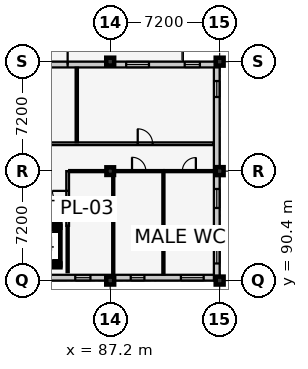
"""IFC4 building model, lengths in metres.
Left out: names, types, materials, properties, quantities, classifications, styles, units other than length and angle.
Written with IfcOpenShell. Run it as: python <this file> out.ifc"""

import sys

from ifc_helpers import new_model, si_unit, direction, frame, frame_2d, origin, origin_2d, place, context, subcontext, project, spatial, rectangle, extrude, element, fill, save


model = new_model("IFC4")
c1 = context("Model", 3, precision=1e-05, world=origin(), true_north=direction((0.0, 1.0)))
c2 = subcontext(c1, "Body", "Model", "MODEL_VIEW")
j1 = project(units=[si_unit("LENGTHUNIT", "METRE"), si_unit("PLANEANGLEUNIT", "RADIAN")], contexts=[c1])
p1 = place(None, origin())
s1 = spatial("IfcSite", under=j1, at=p1, CompositionType="ELEMENT")
p2 = place(p1, origin())
s2 = spatial("IfcBuilding", under=s1, at=p2, CompositionType="ELEMENT")
p3 = place(p2, frame((0.0, 0.0, 21.9)))
s3 = spatial("IfcBuildingStorey", under=s2, at=p3, CompositionType="ELEMENT", Elevation=21.9)
p4 = place(p3, frame((87.2, 90.4, 0.0), z_axis=(0.0, 0.0, 1.0), x_axis=(1.0, 0.0, 0.0)))
e1 = element("IfcColumn", 1, at=p4, inside=s3, PredefinedType="COLUMN", context=c2, shape_type="SweptSolid", body=[
    extrude(rectangle(XDim=0.52, YDim=0.52, at=origin_2d()), origin(), (0.0, 0.0, 1.0), 3.9),
])
p5 = place(p3, frame((87.2, 97.6, 0.0), z_axis=(0.0, 0.0, 1.0), x_axis=(1.0, 0.0, 0.0)))
e2 = element("IfcColumn", 2, at=p5, inside=s3, PredefinedType="COLUMN", context=c2, shape_type="SweptSolid", body=[
    extrude(rectangle(XDim=0.5, YDim=0.5, at=origin_2d()), origin(), (0.0, 0.0, 1.0), 3.9),
])
for number, where, z_axis, x_axis in (
    (3, (87.2, 104.8, 0.0), (0.0, 0.0, 1.0), (1.0, 0.0, 0.0)),
    (4, (94.4, 90.4, 0.0), (0.0, 0.0, 1.0), (1.0, 0.0, 0.0)),
    (5, (94.4, 97.6, 0.0), (0.0, 0.0, 1.0), (1.0, 0.0, 0.0)),
    (6, (94.4, 104.8, 0.0), (0.0, 0.0, 1.0), (1.0, 0.0, 0.0)),
):
    element("IfcColumn", number, at=place(p3, frame(where, z_axis=z_axis, x_axis=x_axis)), inside=s3, PredefinedType="COLUMN", context=c2, shape_type="SweptSolid", body=[
        extrude(rectangle(XDim=0.52, YDim=0.52, at=origin_2d()), origin(), (0.0, 0.0, 1.0), 3.9),
    ])
p6 = place(p3, frame((94.4, 90.59, 0.0), z_axis=(0.0, 0.0, 1.0), x_axis=(-1.0, 0.0, 0.0)))
e7 = element("IfcWall", 7, at=p6, inside=s3, PredefinedType="SOLIDWALL", context=c2, shape_type="SweptSolid", body=[
    extrude(rectangle(XDim=28.8, YDim=0.38, at=frame_2d((14.4, 0.0))), origin(), (0.0, 0.0, 1.0), 2.955),
])
p7 = place(p6, frame((1.05, 0.0, 0.9)))
e8 = element("IfcOpeningElement", 8, at=p7, cuts=e7, PredefinedType="OPENING", context=c2, shape_type="SweptSolid", body=[
    extrude(rectangle(XDim=1.5, YDim=1.75, at=frame_2d((0.75, 0.875))), frame((0.0, 0.202, 0.0), z_axis=(0.0, -1.0, 0.0), x_axis=(1.0, 0.0, 0.0)), (0.0, 0.0, 1.0), 0.404),
])
p8 = place(p6, frame((4.95, 0.0, 0.9)))
e9 = element("IfcOpeningElement", 9, at=p8, cuts=e7, PredefinedType="OPENING", context=c2, shape_type="SweptSolid", body=[
    extrude(rectangle(XDim=0.9, YDim=1.35, at=frame_2d((0.45, 0.675))), frame((0.0, 0.202, 0.0), z_axis=(0.0, -1.0, 0.0), x_axis=(1.0, 0.0, 0.0)), (0.0, 0.0, 1.0), 0.404),
])
p9 = place(p6, frame((8.5, 0.0, 0.9)))
e10 = element("IfcOpeningElement", 10, at=p9, cuts=e7, PredefinedType="OPENING", context=c2, shape_type="SweptSolid", body=[
    extrude(rectangle(XDim=1.0, YDim=1.35, at=frame_2d((0.5, 0.675))), frame((0.0, 0.202, 0.0), z_axis=(0.0, -1.0, 0.0), x_axis=(1.0, 0.0, 0.0)), (0.0, 0.0, 1.0), 0.404),
])
p10 = place(p6, frame((12.05, 0.0, 0.9)))
e11 = element("IfcOpeningElement", 11, at=p10, cuts=e7, PredefinedType="OPENING", context=c2, shape_type="SweptSolid", body=[
    extrude(rectangle(XDim=1.1, YDim=1.35, at=frame_2d((0.55, 0.675))), frame((0.0, 0.202, 0.0), z_axis=(0.0, -1.0, 0.0), x_axis=(1.0, 0.0, 0.0)), (0.0, 0.0, 1.0), 0.404),
])
p11 = place(p6, frame((15.6, 0.0, 0.9)))
e12 = element("IfcOpeningElement", 12, at=p11, cuts=e7, PredefinedType="OPENING", context=c2, shape_type="SweptSolid", body=[
    extrude(rectangle(XDim=1.2, YDim=1.35, at=frame_2d((0.6, 0.675))), frame((0.0, 0.202, 0.0), z_axis=(0.0, -1.0, 0.0), x_axis=(1.0, 0.0, 0.0)), (0.0, 0.0, 1.0), 0.404),
])
p12 = place(p6, frame((19.15, 0.0, 0.9)))
e13 = element("IfcOpeningElement", 13, at=p12, cuts=e7, PredefinedType="OPENING", context=c2, shape_type="SweptSolid", body=[
    extrude(rectangle(XDim=1.3, YDim=1.35, at=frame_2d((0.65, 0.675))), frame((0.0, 0.202, 0.0), z_axis=(0.0, -1.0, 0.0), x_axis=(1.0, 0.0, 0.0)), (0.0, 0.0, 1.0), 0.404),
])
p13 = place(p6, frame((26.525, 0.0, 0.9)))
e14 = element("IfcOpeningElement", 14, at=p13, cuts=e7, PredefinedType="OPENING", context=c2, shape_type="SweptSolid", body=[
    extrude(rectangle(XDim=0.95, YDim=1.45, at=frame_2d((0.475, 0.725))), frame((0.0, 0.202, 0.0), z_axis=(0.0, -1.0, 0.0), x_axis=(1.0, 0.0, 0.0)), (0.0, 0.0, 1.0), 0.404),
])
p14 = place(p3, frame((94.21, 104.8, 0.0), z_axis=(0.0, 0.0, 1.0), x_axis=(0.0, -1.0, 0.0)))
e15 = element("IfcWall", 15, at=p14, inside=s3, PredefinedType="SOLIDWALL", context=c2, shape_type="SweptSolid", body=[
    extrude(rectangle(XDim=14.4, YDim=0.38, at=frame_2d((7.2, 0.0))), origin(), (0.0, 0.0, 1.0), 2.915),
])
p15 = place(p14, frame((1.275, 0.0, 0.9)))
e16 = element("IfcOpeningElement", 16, at=p15, cuts=e15, PredefinedType="OPENING", context=c2, shape_type="SweptSolid", body=[
    extrude(rectangle(XDim=1.05, YDim=1.45, at=frame_2d((0.525, 0.725))), frame((0.0, 0.202, 0.0), z_axis=(0.0, -1.0, 0.0), x_axis=(1.0, 0.0, 0.0)), (0.0, 0.0, 1.0), 0.404),
])
p16 = place(p14, frame((8.375, 0.0, 0.9)))
e17 = element("IfcOpeningElement", 17, at=p16, cuts=e15, PredefinedType="OPENING", context=c2, shape_type="SweptSolid", body=[
    extrude(rectangle(XDim=1.25, YDim=1.45, at=frame_2d((0.625, 0.725))), frame((0.0, 0.202, 0.0), z_axis=(0.0, -1.0, 0.0), x_axis=(1.0, 0.0, 0.0)), (0.0, 0.0, 1.0), 0.404),
])
p17 = place(p14, frame((11.925, 0.0, 0.9)))
e18 = element("IfcOpeningElement", 18, at=p17, cuts=e15, PredefinedType="OPENING", context=c2, shape_type="SweptSolid", body=[
    extrude(rectangle(XDim=1.35, YDim=1.45, at=frame_2d((0.675, 0.725))), frame((0.0, 0.202, 0.0), z_axis=(0.0, -1.0, 0.0), x_axis=(1.0, 0.0, 0.0)), (0.0, 0.0, 1.0), 0.404),
])
p18 = place(p3, frame((65.6, 104.61, 0.0), z_axis=(0.0, 0.0, 1.0), x_axis=(1.0, 0.0, 0.0)))
e19 = element("IfcWall", 19, at=p18, inside=s3, PredefinedType="SOLIDWALL", context=c2, shape_type="SweptSolid", body=[
    extrude(rectangle(XDim=28.8, YDim=0.38, at=frame_2d((14.4, 0.0))), origin(), (0.0, 0.0, 1.0), 2.955),
])
p19 = place(p18, frame((17.2, 0.0, 0.0)))
e20 = element("IfcOpeningElement", 20, at=p19, cuts=e19, PredefinedType="OPENING", context=c2, shape_type="SweptSolid", body=[
    extrude(rectangle(XDim=1.6, YDim=2.2, at=frame_2d((0.8, 1.1))), frame((0.0, 0.202, 0.0), z_axis=(0.0, -1.0, 0.0), x_axis=(1.0, 0.0, 0.0)), (0.0, 0.0, 1.0), 0.404),
])
p20 = place(p18, frame((1.075, 0.0, 0.9)))
e21 = element("IfcOpeningElement", 21, at=p20, cuts=e19, PredefinedType="OPENING", context=c2, shape_type="SweptSolid", body=[
    extrude(rectangle(XDim=1.45, YDim=1.45, at=frame_2d((0.725, 0.725))), frame((0.0, 0.202, 0.0), z_axis=(0.0, -1.0, 0.0), x_axis=(1.0, 0.0, 0.0)), (0.0, 0.0, 1.0), 0.404),
])
p21 = place(p18, frame((4.95, 0.0, 0.9)))
e22 = element("IfcOpeningElement", 22, at=p21, cuts=e19, PredefinedType="OPENING", context=c2, shape_type="SweptSolid", body=[
    extrude(rectangle(XDim=0.9, YDim=1.6, at=frame_2d((0.45, 0.8))), frame((0.0, 0.202, 0.0), z_axis=(0.0, -1.0, 0.0), x_axis=(1.0, 0.0, 0.0)), (0.0, 0.0, 1.0), 0.404),
])
p22 = place(p18, frame((8.475, 0.0, 0.9)))
e23 = element("IfcOpeningElement", 23, at=p22, cuts=e19, PredefinedType="OPENING", context=c2, shape_type="SweptSolid", body=[
    extrude(rectangle(XDim=1.05, YDim=1.6, at=frame_2d((0.525, 0.8))), frame((0.0, 0.202, 0.0), z_axis=(0.0, -1.0, 0.0), x_axis=(1.0, 0.0, 0.0)), (0.0, 0.0, 1.0), 0.404),
])
p23 = place(p18, frame((12.025, 0.0, 0.9)))
e24 = element("IfcOpeningElement", 24, at=p23, cuts=e19, PredefinedType="OPENING", context=c2, shape_type="SweptSolid", body=[
    extrude(rectangle(XDim=1.15, YDim=1.6, at=frame_2d((0.575, 0.8))), frame((0.0, 0.202, 0.0), z_axis=(0.0, -1.0, 0.0), x_axis=(1.0, 0.0, 0.0)), (0.0, 0.0, 1.0), 0.404),
])
p24 = place(p18, frame((22.65, 0.0, 0.9)))
e25 = element("IfcOpeningElement", 25, at=p24, cuts=e19, PredefinedType="OPENING", context=c2, shape_type="SweptSolid", body=[
    extrude(rectangle(XDim=1.5, YDim=1.6, at=frame_2d((0.75, 0.8))), frame((0.0, 0.202, 0.0), z_axis=(0.0, -1.0, 0.0), x_axis=(1.0, 0.0, 0.0)), (0.0, 0.0, 1.0), 0.404),
])
p25 = place(p18, frame((26.5, 0.0, 0.9)))
e26 = element("IfcOpeningElement", 26, at=p25, cuts=e19, PredefinedType="OPENING", context=c2, shape_type="SweptSolid", body=[
    extrude(rectangle(XDim=1.0, YDim=1.75, at=frame_2d((0.5, 0.875))), frame((0.0, 0.202, 0.0), z_axis=(0.0, -1.0, 0.0), x_axis=(1.0, 0.0, 0.0)), (0.0, 0.0, 1.0), 0.404),
])
p26 = place(p3, frame((81.675, 91.4, 0.0), z_axis=(0.0, 0.0, 1.0), x_axis=(1.0, 0.0, 0.0)))
e27 = element("IfcWall", 27, at=p26, inside=s3, PredefinedType="SHEAR", context=c2, shape_type="SweptSolid", body=[
    extrude(rectangle(XDim=2.25, YDim=0.25, at=frame_2d((1.125, 0.0))), origin(), (0.0, 0.0, 1.0), 3.66),
])
p27 = place(p3, frame((83.925, 94.0, 0.0), z_axis=(0.0, 0.0, 1.0), x_axis=(-1.0, 0.0, 0.0)))
e28 = element("IfcWall", 28, at=p27, inside=s3, PredefinedType="SHEAR", context=c2, shape_type="SweptSolid", body=[
    extrude(rectangle(XDim=2.25, YDim=0.25, at=frame_2d((1.125, 0.0))), origin(), (0.0, 0.0, 1.0), 3.66),
])
p28 = place(p27, frame((0.625, 0.0, 0.0)))
e29 = element("IfcOpeningElement", 29, at=p28, cuts=e28, PredefinedType="OPENING", context=c2, shape_type="SweptSolid", body=[
    extrude(rectangle(XDim=1.0, YDim=2.15, at=frame_2d((0.5, 1.075))), frame((0.0, 0.137, 0.0), z_axis=(0.0, -1.0, 0.0), x_axis=(1.0, 0.0, 0.0)), (0.0, 0.0, 1.0), 0.274),
])
p29 = place(p3, frame((83.8, 91.4, 0.0), z_axis=(0.0, 0.0, 1.0), x_axis=(0.0, 1.0, 0.0)))
e30 = element("IfcWall", 30, at=p29, inside=s3, PredefinedType="SHEAR", context=c2, shape_type="SweptSolid", body=[
    extrude(rectangle(XDim=2.6, YDim=0.25, at=frame_2d((1.3, 0.0))), origin(), (0.0, 0.0, 1.0), 3.66),
])
p30 = place(p3, frame((66.0, 99.4, 0.0), z_axis=(0.0, 0.0, 1.0), x_axis=(1.0, 0.0, 0.0)))
e31 = element("IfcWall", 31, at=p30, inside=s3, PredefinedType="PARTITIONING", context=c2, shape_type="SweptSolid", body=[
    extrude(rectangle(XDim=28.0, YDim=0.18, at=frame_2d((14.0, 0.0))), origin(), (0.0, 0.0, 1.0), 3.66),
])
p31 = place(p30, frame((4.98, 0.0, 0.0)))
e32 = element("IfcOpeningElement", 32, at=p31, cuts=e31, PredefinedType="OPENING", context=c2, shape_type="SweptSolid", body=[
    extrude(rectangle(XDim=1.04, YDim=2.15, at=frame_2d((0.52, 1.075))), frame((0.0, 0.102, 0.0), z_axis=(0.0, -1.0, 0.0), x_axis=(1.0, 0.0, 0.0)), (0.0, 0.0, 1.0), 0.204),
])
p32 = place(p30, frame((14.49, 0.0, 0.0)))
e33 = element("IfcOpeningElement", 33, at=p32, cuts=e31, PredefinedType="OPENING", context=c2, shape_type="SweptSolid", body=[
    extrude(rectangle(XDim=1.02, YDim=2.12, at=frame_2d((0.51, 1.06))), frame((0.0, 0.102, 0.0), z_axis=(0.0, -1.0, 0.0), x_axis=(1.0, 0.0, 0.0)), (0.0, 0.0, 1.0), 0.204),
])
p33 = place(p30, frame((23.01, 0.0, 0.0)))
e34 = element("IfcOpeningElement", 34, at=p33, cuts=e31, PredefinedType="OPENING", context=c2, shape_type="SweptSolid", body=[
    extrude(rectangle(XDim=0.98, YDim=2.12, at=frame_2d((0.49, 1.06))), frame((0.0, 0.102, 0.0), z_axis=(0.0, -1.0, 0.0), x_axis=(1.0, 0.0, 0.0)), (0.0, 0.0, 1.0), 0.204),
])
p34 = place(p3, frame((84.4, 94.0, 0.0), z_axis=(0.0, 0.0, 1.0), x_axis=(0.0, 1.0, 0.0)))
e35 = element("IfcWall", 35, at=p34, inside=s3, PredefinedType="PARTITIONING", context=c2, shape_type="SweptSolid", body=[
    extrude(rectangle(XDim=3.6, YDim=0.18, at=frame_2d((1.8, 0.0))), origin(), (0.0, 0.0, 1.0), 3.66),
])
p35 = place(p34, frame((1.3, 0.0, 0.0)))
e36 = element("IfcOpeningElement", 36, at=p35, cuts=e35, PredefinedType="OPENING", context=c2, shape_type="SweptSolid", body=[
    extrude(rectangle(XDim=1.0, YDim=2.1, at=frame_2d((0.5, 1.05))), frame((0.0, 0.102, 0.0), z_axis=(0.0, -1.0, 0.0), x_axis=(1.0, 0.0, 0.0)), (0.0, 0.0, 1.0), 0.204),
])
p36 = place(p3, frame((84.5, 97.6, 0.0), z_axis=(0.0, 0.0, 1.0), x_axis=(1.0, 0.0, 0.0)))
e37 = element("IfcWall", 37, at=p36, inside=s3, PredefinedType="PARTITIONING", context=c2, shape_type="SweptSolid", body=[
    extrude(rectangle(XDim=2.9, YDim=0.14, at=frame_2d((1.45, 0.0))), origin(), (0.0, 0.0, 1.0), 2.985),
])
p37 = place(p3, frame((87.4, 90.8, 0.0), z_axis=(0.0, 0.0, 1.0), x_axis=(0.0, 1.0, 0.0)))
e38 = element("IfcWall", 38, at=p37, inside=s3, PredefinedType="PARTITIONING", context=c2, shape_type="SweptSolid", body=[
    extrude(rectangle(XDim=6.72, YDim=0.14, at=frame_2d((3.36, 0.0))), origin(), (0.0, 0.0, 1.0), 3.035),
])
p38 = place(p3, frame((87.48, 97.6, 0.0), z_axis=(0.0, 0.0, 1.0), x_axis=(1.0, 0.0, 0.0)))
e39 = element("IfcWall", 39, at=p38, inside=s3, PredefinedType="PARTITIONING", context=c2, shape_type="SweptSolid", body=[
    extrude(rectangle(XDim=3.22, YDim=0.14, at=frame_2d((1.61, 0.0))), origin(), (0.0, 0.0, 1.0), 2.935),
])
p39 = place(p38, frame((1.155, 0.0, 0.0)))
e40 = element("IfcOpeningElement", 40, at=p39, cuts=e39, PredefinedType="OPENING", context=c2, shape_type="SweptSolid", body=[
    extrude(rectangle(XDim=0.91, YDim=2.06, at=frame_2d((0.455, 1.03))), frame((0.0, 0.082, 0.0), z_axis=(0.0, -1.0, 0.0), x_axis=(1.0, 0.0, 0.0)), (0.0, 0.0, 1.0), 0.164),
])
p40 = place(p3, frame((90.7, 90.8, 0.0), z_axis=(0.0, 0.0, 1.0), x_axis=(0.0, 1.0, 0.0)))
e41 = element("IfcWall", 41, at=p40, inside=s3, PredefinedType="PARTITIONING", context=c2, shape_type="SweptSolid", body=[
    extrude(rectangle(XDim=6.72, YDim=0.14, at=frame_2d((3.36, 0.0))), origin(), (0.0, 0.0, 1.0), 3.405),
])
p41 = place(p3, frame((90.78, 97.6, 0.0), z_axis=(0.0, 0.0, 1.0), x_axis=(1.0, 0.0, 0.0)))
e42 = element("IfcWall", 42, at=p41, inside=s3, PredefinedType="PARTITIONING", context=c2, shape_type="SweptSolid", body=[
    extrude(rectangle(XDim=3.22, YDim=0.14, at=frame_2d((1.61, 0.0))), origin(), (0.0, 0.0, 1.0), 2.935),
])
p42 = place(p41, frame((1.165, 0.0, 0.0)))
e43 = element("IfcOpeningElement", 43, at=p42, cuts=e42, PredefinedType="OPENING", context=c2, shape_type="SweptSolid", body=[
    extrude(rectangle(XDim=0.89, YDim=2.05, at=frame_2d((0.445, 1.025))), frame((0.0, 0.082, 0.0), z_axis=(0.0, -1.0, 0.0), x_axis=(1.0, 0.0, 0.0)), (0.0, 0.0, 1.0), 0.164),
])
p43 = place(p3, frame((85.0, 99.5, 0.0), z_axis=(0.0, 0.0, 1.0), x_axis=(0.0, 1.0, 0.0)))
e44 = element("IfcWall", 44, at=p43, inside=s3, PredefinedType="PARTITIONING", context=c2, shape_type="SweptSolid", body=[
    extrude(rectangle(XDim=4.9, YDim=0.15, at=frame_2d((2.45, 0.0))), origin(), (0.0, 0.0, 1.0), 3.66),
])
p44 = place(p3, frame((84.4, 90.95, 0.0), z_axis=(0.0, 0.0, 1.0), x_axis=(0.0, 1.0, 0.0)))
e45 = element("IfcWall", 45, at=p44, inside=s3, PredefinedType="PARTITIONING", context=c2, shape_type="SweptSolid", body=[
    extrude(rectangle(XDim=3.0, YDim=0.14, at=frame_2d((1.5, 0.0))), origin(), (0.0, 0.0, 1.0), 3.66),
])
p45 = place(p7, origin())
e46 = element("IfcWindow", 46, at=p45, inside=s3, PartitioningType="SINGLE_PANEL", PredefinedType="WINDOW", context=c2, shape_type="SweptSolid", body=[
    extrude(rectangle(XDim=1.5, YDim=1.75, at=frame_2d((0.75, 0.875))), frame((0.0, 0.03, 0.0), z_axis=(0.0, -1.0, 0.0), x_axis=(1.0, 0.0, 0.0)), (0.0, 0.0, 1.0), 0.06),
])
fill(e8, e46)
p46 = place(p8, origin())
e47 = element("IfcWindow", 47, at=p46, inside=s3, PartitioningType="SINGLE_PANEL", PredefinedType="WINDOW", context=c2, shape_type="SweptSolid", body=[
    extrude(rectangle(XDim=0.9, YDim=1.35, at=frame_2d((0.45, 0.675))), frame((0.0, 0.03, 0.0), z_axis=(0.0, -1.0, 0.0), x_axis=(1.0, 0.0, 0.0)), (0.0, 0.0, 1.0), 0.06),
])
fill(e9, e47)
p47 = place(p9, origin())
e48 = element("IfcWindow", 48, at=p47, inside=s3, PartitioningType="SINGLE_PANEL", PredefinedType="WINDOW", context=c2, shape_type="SweptSolid", body=[
    extrude(rectangle(XDim=1.0, YDim=1.35, at=frame_2d((0.5, 0.675))), frame((0.0, 0.03, 0.0), z_axis=(0.0, -1.0, 0.0), x_axis=(1.0, 0.0, 0.0)), (0.0, 0.0, 1.0), 0.06),
])
fill(e10, e48)
p48 = place(p15, origin())
e49 = element("IfcWindow", 49, at=p48, inside=s3, PartitioningType="SINGLE_PANEL", PredefinedType="WINDOW", context=c2, shape_type="SweptSolid", body=[
    extrude(rectangle(XDim=1.05, YDim=1.45, at=frame_2d((0.525, 0.725))), frame((0.0, 0.03, 0.0), z_axis=(0.0, -1.0, 0.0), x_axis=(1.0, 0.0, 0.0)), (0.0, 0.0, 1.0), 0.06),
])
fill(e16, e49)
p49 = place(p16, origin())
e50 = element("IfcWindow", 50, at=p49, inside=s3, PartitioningType="SINGLE_PANEL", PredefinedType="WINDOW", context=c2, shape_type="SweptSolid", body=[
    extrude(rectangle(XDim=1.25, YDim=1.45, at=frame_2d((0.625, 0.725))), frame((0.0, 0.03, 0.0), z_axis=(0.0, -1.0, 0.0), x_axis=(1.0, 0.0, 0.0)), (0.0, 0.0, 1.0), 0.06),
])
fill(e17, e50)
p50 = place(p17, origin())
e51 = element("IfcWindow", 51, at=p50, inside=s3, PartitioningType="SINGLE_PANEL", PredefinedType="WINDOW", context=c2, shape_type="SweptSolid", body=[
    extrude(rectangle(XDim=1.35, YDim=1.45, at=frame_2d((0.675, 0.725))), frame((0.0, 0.03, 0.0), z_axis=(0.0, -1.0, 0.0), x_axis=(1.0, 0.0, 0.0)), (0.0, 0.0, 1.0), 0.06),
])
fill(e18, e51)
p51 = place(p19, origin())
e52 = element("IfcDoor", 52, at=p51, inside=s3, OperationType="SINGLE_SWING_RIGHT", PredefinedType="DOOR", context=c2, shape_type="SweptSolid", body=[
    extrude(rectangle(XDim=1.6, YDim=2.2, at=frame_2d((0.8, 1.1))), frame((0.0, 0.025, 0.0), z_axis=(0.0, -1.0, 0.0), x_axis=(1.0, 0.0, 0.0)), (0.0, 0.0, 1.0), 0.05),
])
fill(e20, e52)
p52 = place(p24, origin())
e53 = element("IfcWindow", 53, at=p52, inside=s3, PartitioningType="SINGLE_PANEL", PredefinedType="WINDOW", context=c2, shape_type="SweptSolid", body=[
    extrude(rectangle(XDim=1.5, YDim=1.6, at=frame_2d((0.75, 0.8))), frame((0.0, 0.03, 0.0), z_axis=(0.0, -1.0, 0.0), x_axis=(1.0, 0.0, 0.0)), (0.0, 0.0, 1.0), 0.06),
])
fill(e25, e53)
p53 = place(p25, origin())
e54 = element("IfcWindow", 54, at=p53, inside=s3, PartitioningType="SINGLE_PANEL", PredefinedType="WINDOW", context=c2, shape_type="SweptSolid", body=[
    extrude(rectangle(XDim=1.0, YDim=1.75, at=frame_2d((0.5, 0.875))), frame((0.0, 0.03, 0.0), z_axis=(0.0, -1.0, 0.0), x_axis=(1.0, 0.0, 0.0)), (0.0, 0.0, 1.0), 0.06),
])
fill(e26, e54)
p54 = place(p35, origin())
e55 = element("IfcDoor", 55, at=p54, inside=s3, OperationType="SINGLE_SWING_RIGHT", PredefinedType="DOOR", context=c2, shape_type="SweptSolid", body=[
    extrude(rectangle(XDim=1.0, YDim=2.1, at=frame_2d((0.5, 1.05))), frame((0.0, 0.025, 0.0), z_axis=(0.0, -1.0, 0.0), x_axis=(1.0, 0.0, 0.0)), (0.0, 0.0, 1.0), 0.05),
])
fill(e36, e55)
p55 = place(p39, origin())
e56 = element("IfcDoor", 56, at=p55, inside=s3, OperationType="SINGLE_SWING_LEFT", PredefinedType="DOOR", context=c2, shape_type="SweptSolid", body=[
    extrude(rectangle(XDim=0.91, YDim=2.06, at=frame_2d((0.455, 1.03))), frame((0.0, 0.025, 0.0), z_axis=(0.0, -1.0, 0.0), x_axis=(1.0, 0.0, 0.0)), (0.0, 0.0, 1.0), 0.05),
])
fill(e40, e56)
p56 = place(p42, origin())
e57 = element("IfcDoor", 57, at=p56, inside=s3, OperationType="SINGLE_SWING_RIGHT", PredefinedType="DOOR", context=c2, shape_type="SweptSolid", body=[
    extrude(rectangle(XDim=0.89, YDim=2.05, at=frame_2d((0.445, 1.025))), frame((0.0, 0.025, 0.0), z_axis=(0.0, -1.0, 0.0), x_axis=(1.0, 0.0, 0.0)), (0.0, 0.0, 1.0), 0.05),
])
fill(e43, e57)
p57 = place(p33, origin())
e58 = element("IfcDoor", 58, at=p57, inside=s3, OperationType="SINGLE_SWING_LEFT", PredefinedType="DOOR", context=c2, shape_type="SweptSolid", body=[
    extrude(rectangle(XDim=0.98, YDim=2.12, at=frame_2d((0.49, 1.06))), frame((0.0, 0.025, 0.0), z_axis=(0.0, -1.0, 0.0), x_axis=(1.0, 0.0, 0.0)), (0.0, 0.0, 1.0), 0.05),
])
fill(e34, e58)
save(model, sys.argv[1])
